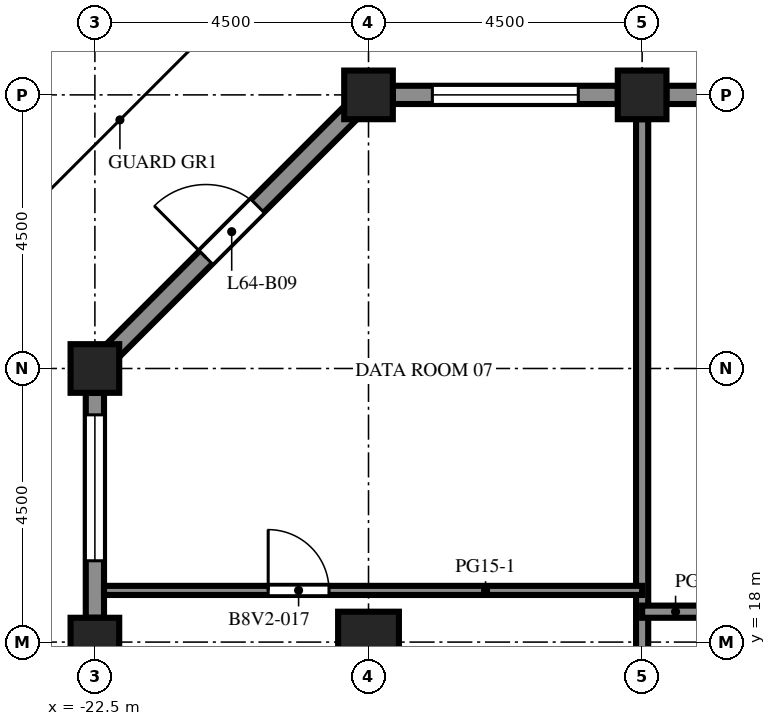
"""IFC4 building model, lengths in metres.
Left out: names, types, materials, properties, quantities, classifications, styles, units other than length and angle.
Written with IfcOpenShell. Run it as: python <this file> out.ifc"""

import sys

from ifc_helpers import new_model, si_unit, direction, frame, frame_2d, origin, origin_2d, place, context, subcontext, project, spatial, rectangle, extrude, element, fill, save


model = new_model("IFC4")
c1 = context("Model", 3, precision=1e-05, world=origin(), true_north=direction((0.0, 1.0)))
c2 = subcontext(c1, "Body", "Model", "MODEL_VIEW")
j1 = project(units=[si_unit("LENGTHUNIT", "METRE"), si_unit("PLANEANGLEUNIT", "RADIAN")], contexts=[c1])
p1 = place(None, origin())
s1 = spatial("IfcSite", under=j1, at=p1, CompositionType="ELEMENT")
p2 = place(p1, origin())
s2 = spatial("IfcBuilding", under=s1, at=p2, CompositionType="ELEMENT")
p3 = place(p2, frame((0.0, 0.0, 282.7)))
s3 = spatial("IfcBuildingStorey", under=s2, at=p3, CompositionType="ELEMENT", Elevation=282.7)
for number, where, z_axis, x_axis in (
    (1, (-22.5, 18.0, 0.0), (0.0, 0.0, 1.0), (1.0, 0.0, 0.0)),
    (2, (-22.5, 22.5, 0.0), (0.0, 0.0, 1.0), (1.0, 0.0, 0.0)),
    (3, (-18.0, 27.0, 0.0), (0.0, 0.0, 1.0), (1.0, 0.0, 0.0)),
    (4, (-13.5, 27.0, 0.0), (0.0, 0.0, 1.0), (1.0, 0.0, 0.0)),
):
    element("IfcColumn", number, at=place(p3, frame(where, z_axis=z_axis, x_axis=x_axis)), inside=s3, PredefinedType="COLUMN", context=c2, shape_type="SweptSolid", body=[
        extrude(rectangle(XDim=0.8, YDim=0.8, at=origin_2d()), origin(), (0.0, 0.0, 1.0), 4.1),
    ])
p4 = place(p3, frame((-18.0, 18.0, 0.0), z_axis=(0.0, 0.0, 1.0), x_axis=(1.0, 0.0, 0.0)))
e5 = element("IfcColumn", 5, at=p4, inside=s3, PredefinedType="COLUMN", context=c2, shape_type="SweptSolid", body=[
    extrude(rectangle(XDim=1.0, YDim=1.0, at=origin_2d()), origin(), (0.0, 0.0, 1.0), 4.1),
])
p5 = place(p3, frame((-13.1, 27.0, 0.0), z_axis=(0.0, 0.0, 1.0), x_axis=(1.0, 0.0, 0.0)))
e6 = element("IfcWall", 6, at=p5, inside=s3, PredefinedType="SOLIDWALL", context=c2, shape_type="SweptSolid", body=[
    extrude(rectangle(XDim=3.7, YDim=0.3, at=frame_2d((1.85, 0.0))), origin(), (0.0, 0.0, 1.0), 2.85),
])
p6 = place(p5, frame((1.35, 0.0, 0.0)))
e7 = element("IfcOpeningElement", 7, at=p6, cuts=e6, PredefinedType="OPENING", context=c2, shape_type="SweptSolid", body=[
    extrude(rectangle(XDim=1.0, YDim=2.2, at=frame_2d((0.5, 1.1))), frame((0.0, 0.16, 0.0), z_axis=(0.0, -1.0, 0.0), x_axis=(1.0, 0.0, 0.0)), (0.0, 0.0, 1.0), 0.32),
])
p7 = place(p3, frame((-17.6, 27.0, 0.0), z_axis=(0.0, 0.0, 1.0), x_axis=(1.0, 0.0, 0.0)))
e8 = element("IfcWall", 8, at=p7, inside=s3, PredefinedType="SOLIDWALL", context=c2, shape_type="SweptSolid", body=[
    extrude(rectangle(XDim=3.7, YDim=0.3, at=frame_2d((1.85, 0.0))), origin(), (0.0, 0.0, 1.0), 2.85),
])
p8 = place(p7, frame((0.65, 0.0, 0.8)))
e9 = element("IfcOpeningElement", 9, at=p8, cuts=e8, PredefinedType="OPENING", context=c2, shape_type="SweptSolid", body=[
    extrude(rectangle(XDim=2.4, YDim=1.7, at=frame_2d((1.2, 0.85))), frame((0.0, 0.16, 0.0), z_axis=(0.0, -1.0, 0.0), x_axis=(1.0, 0.0, 0.0)), (0.0, 0.0, 1.0), 0.32),
])
p9 = place(p3, frame((-22.206, 22.794, 0.0), z_axis=(0.0, 0.0, 1.0), x_axis=(0.707106781187, 0.707106781187, 0.0)))
e10 = element("IfcWall", 10, at=p9, inside=s3, PredefinedType="SOLIDWALL", context=c2, shape_type="SweptSolid", body=[
    extrude(rectangle(XDim=5.532, YDim=0.3, at=frame_2d((2.766, 0.0))), origin(), (0.0, 0.0, 1.0), 2.85),
])
p10 = place(p9, frame((2.166, 0.0, 0.0)))
e11 = element("IfcOpeningElement", 11, at=p10, cuts=e10, PredefinedType="OPENING", context=c2, shape_type="SweptSolid", body=[
    extrude(rectangle(XDim=1.2, YDim=2.2, at=frame_2d((0.6, 1.1))), frame((0.0, 0.16, 0.0), z_axis=(0.0, -1.0, 0.0), x_axis=(1.0, 0.0, 0.0)), (0.0, 0.0, 1.0), 0.32),
])
p11 = place(p3, frame((-22.5, 18.4, 0.0), z_axis=(0.0, 0.0, 1.0), x_axis=(0.0, 1.0, 0.0)))
e12 = element("IfcWall", 12, at=p11, inside=s3, PredefinedType="SOLIDWALL", context=c2, shape_type="SweptSolid", body=[
    extrude(rectangle(XDim=3.7, YDim=0.3, at=frame_2d((1.85, 0.0))), origin(), (0.0, 0.0, 1.0), 2.85),
])
p12 = place(p11, frame((0.938, 0.0, 0.8)))
e13 = element("IfcOpeningElement", 13, at=p12, cuts=e12, PredefinedType="OPENING", context=c2, shape_type="SweptSolid", body=[
    extrude(rectangle(XDim=2.4, YDim=1.7, at=frame_2d((1.2, 0.85))), frame((0.0, 0.16, 0.0), z_axis=(0.0, -1.0, 0.0), x_axis=(1.0, 0.0, 0.0)), (0.0, 0.0, 1.0), 0.32),
])
p13 = place(p3, frame((-13.5, 6.25, 0.0), z_axis=(0.0, 0.0, 1.0), x_axis=(0.0, 1.0, 0.0)))
e14 = element("IfcWall", 14, at=p13, inside=s3, PredefinedType="PARTITIONING", context=c2, shape_type="SweptSolid", body=[
    extrude(rectangle(XDim=20.35, YDim=0.2, at=frame_2d((10.175, 0.0))), origin(), (0.0, 0.0, 1.0), 3.65),
])
p14 = place(p3, frame((-13.5, 18.5, 0.0), z_axis=(0.0, 0.0, 1.0), x_axis=(1.0, 0.0, 0.0)))
e15 = element("IfcWall", 15, at=p14, inside=s3, PredefinedType="PARTITIONING", context=c2, shape_type="SweptSolid", body=[
    extrude(rectangle(XDim=3.0, YDim=0.2, at=frame_2d((1.5, 0.0))), origin(), (0.0, 0.0, 1.0), 3.65),
])
p15 = place(p14, frame((1.1, 0.0, 0.0)))
e16 = element("IfcOpeningElement", 16, at=p15, cuts=e15, PredefinedType="OPENING", context=c2, shape_type="SweptSolid", body=[
    extrude(rectangle(XDim=1.0, YDim=2.1, at=frame_2d((0.5, 1.05))), frame((0.0, 0.11, 0.0), z_axis=(0.0, -1.0, 0.0), x_axis=(1.0, 0.0, 0.0)), (0.0, 0.0, 1.0), 0.22),
])
p16 = place(p3, frame((-22.35, 18.85, 0.0), z_axis=(0.0, 0.0, 1.0), x_axis=(1.0, 0.0, 0.0)))
e17 = element("IfcWall", 17, at=p16, inside=s3, PredefinedType="PARTITIONING", context=c2, shape_type="SweptSolid", body=[
    extrude(rectangle(XDim=8.85, YDim=0.15, at=frame_2d((4.425, 0.0))), origin(), (0.0, 0.0, 1.0), 3.65),
])
p17 = place(p16, frame((2.7, 0.0, 0.0)))
e18 = element("IfcOpeningElement", 18, at=p17, cuts=e17, PredefinedType="OPENING", context=c2, shape_type="SweptSolid", body=[
    extrude(rectangle(XDim=1.0, YDim=2.1, at=frame_2d((0.5, 1.05))), frame((0.0, 0.085, 0.0), z_axis=(0.0, -1.0, 0.0), x_axis=(1.0, 0.0, 0.0)), (0.0, 0.0, 1.0), 0.17),
])
p18 = place(p8, origin())
e19 = element("IfcWindow", 19, at=p18, inside=s3, PartitioningType="SINGLE_PANEL", PredefinedType="WINDOW", context=c2, shape_type="SweptSolid", body=[
    extrude(rectangle(XDim=2.4, YDim=1.7, at=frame_2d((1.2, 0.85))), frame((0.0, 0.03, 0.0), z_axis=(0.0, -1.0, 0.0), x_axis=(1.0, 0.0, 0.0)), (0.0, 0.0, 1.0), 0.06),
])
fill(e9, e19)
p19 = place(p10, origin())
e20 = element("IfcDoor", 20, at=p19, inside=s3, OperationType="SINGLE_SWING_LEFT", PredefinedType="DOOR", context=c2, shape_type="SweptSolid", body=[
    extrude(rectangle(XDim=1.2, YDim=2.2, at=frame_2d((0.6, 1.1))), frame((0.0, 0.025, 0.0), z_axis=(0.0, -1.0, 0.0), x_axis=(1.0, 0.0, 0.0)), (0.0, 0.0, 1.0), 0.05),
])
fill(e11, e20)
p20 = place(p12, origin())
e21 = element("IfcWindow", 21, at=p20, inside=s3, PartitioningType="SINGLE_PANEL", PredefinedType="WINDOW", context=c2, shape_type="SweptSolid", body=[
    extrude(rectangle(XDim=2.4, YDim=1.7, at=frame_2d((1.2, 0.85))), frame((0.0, 0.03, 0.0), z_axis=(0.0, -1.0, 0.0), x_axis=(1.0, 0.0, 0.0)), (0.0, 0.0, 1.0), 0.06),
])
fill(e13, e21)
p21 = place(p17, origin())
e22 = element("IfcDoor", 22, at=p21, inside=s3, OperationType="SINGLE_SWING_LEFT", PredefinedType="DOOR", context=c2, shape_type="SweptSolid", body=[
    extrude(rectangle(XDim=1.0, YDim=2.1, at=frame_2d((0.5, 1.05))), frame((0.0, 0.025, 0.0), z_axis=(0.0, -1.0, 0.0), x_axis=(1.0, 0.0, 0.0)), (0.0, 0.0, 1.0), 0.05),
])
fill(e18, e22)
save(model, sys.argv[1])
